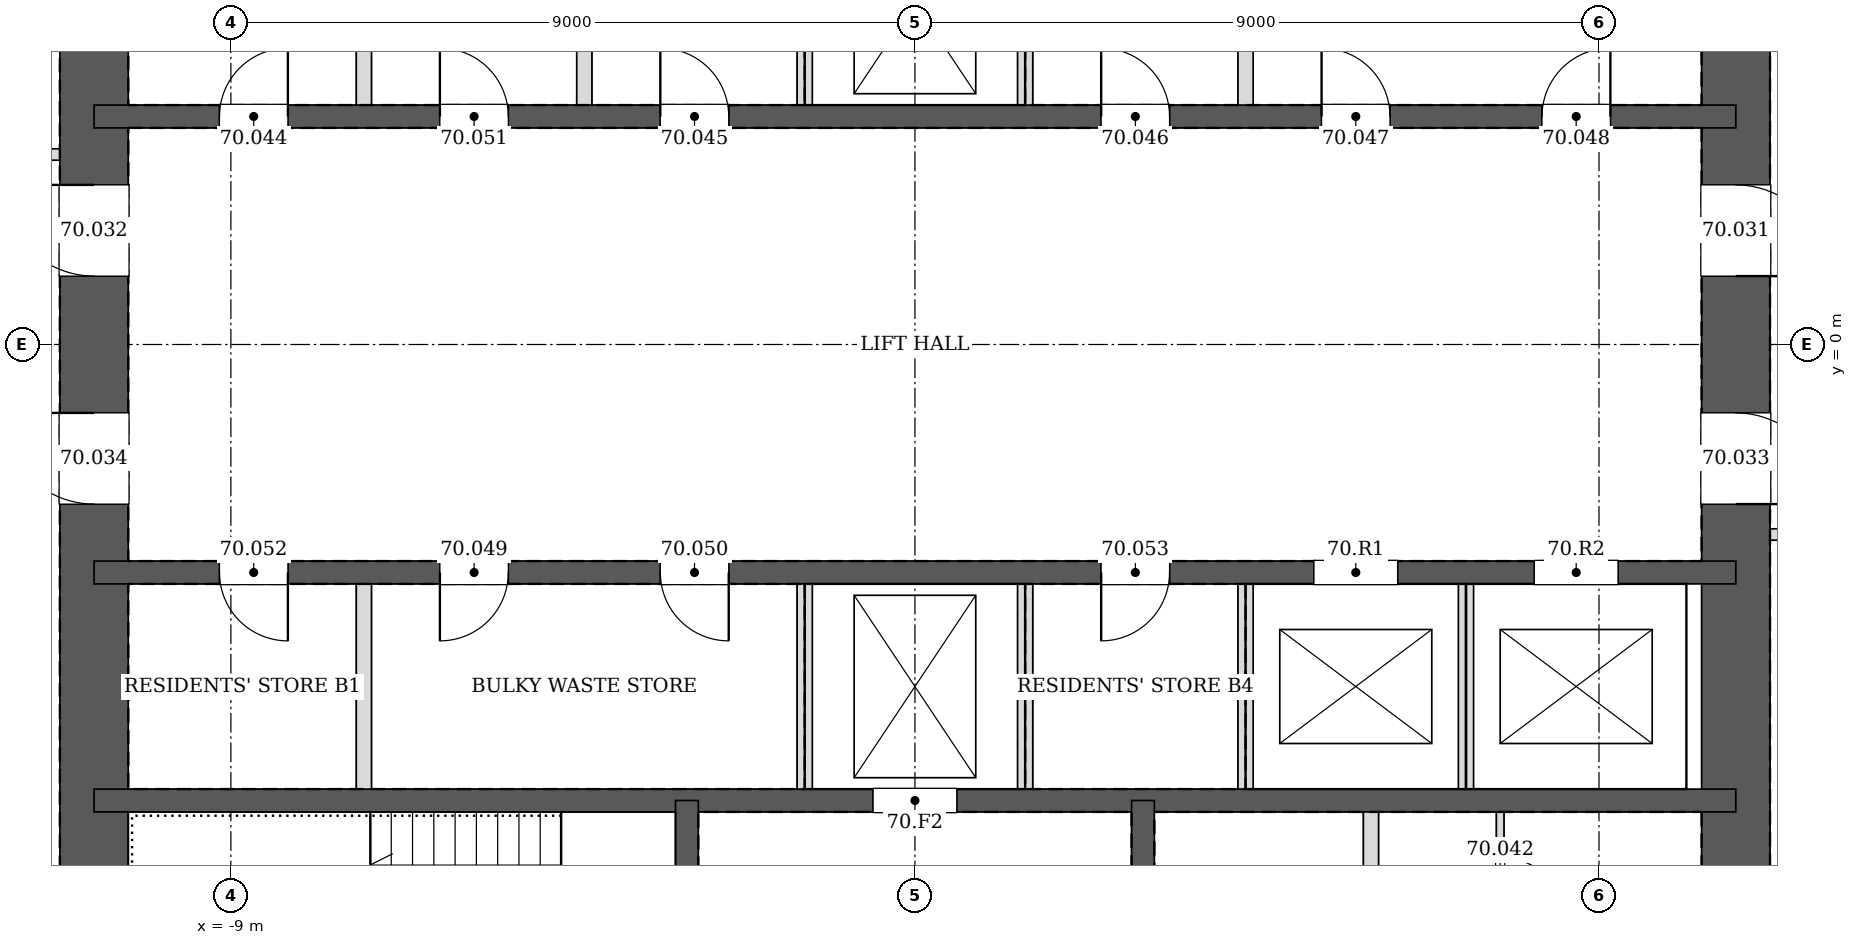
"""IFC4 building model, lengths in metres.
Left out: names, types, materials, properties, quantities, classifications, styles, units other than length and angle.
Written with IfcOpenShell. Run it as: python <this file> out.ifc"""

import sys

from ifc_helpers import new_model, si_unit, direction, frame, frame_2d, origin, place, context, subcontext, project, spatial, rectangle, extrude, element, fill, save


model = new_model("IFC4")
c1 = context("Model", 3, precision=1e-05, world=origin(), true_north=direction((0.0, 1.0)))
c2 = subcontext(c1, "Body", "Model", "MODEL_VIEW")
j1 = project(units=[si_unit("LENGTHUNIT", "METRE"), si_unit("PLANEANGLEUNIT", "RADIAN")], contexts=[c1])
p1 = place(None, origin())
s1 = spatial("IfcSite", under=j1, at=p1, CompositionType="ELEMENT")
p2 = place(p1, origin())
s2 = spatial("IfcBuilding", under=s1, at=p2, CompositionType="ELEMENT")
p3 = place(p2, frame((0.0, 0.0, 287.8)))
s3 = spatial("IfcBuildingStorey", under=s2, at=p3, CompositionType="ELEMENT", Elevation=287.8)
p4 = place(p3, frame((10.8, -10.8, 0.0), z_axis=(0.0, 0.0, 1.0), x_axis=(0.0, 1.0, 0.0)))
e1 = element("IfcWall", 1, at=p4, inside=s3, PredefinedType="SOLIDWALL", context=c2, shape_type="SweptSolid", body=[
    extrude(rectangle(XDim=21.6, YDim=0.9, at=frame_2d((10.8, 0.0))), origin(), (0.0, 0.0, 1.0), 3.4),
])
p5 = place(p4, frame((11.7, 0.0, 0.0)))
e2 = element("IfcOpeningElement", 2, at=p5, cuts=e1, PredefinedType="OPENING", context=c2, shape_type="SweptSolid", body=[
    extrude(rectangle(XDim=1.2, YDim=2.1, at=frame_2d((0.6, 1.05))), frame((0.0, 0.46, 0.0), z_axis=(0.0, -1.0, 0.0), x_axis=(1.0, 0.0, 0.0)), (0.0, 0.0, 1.0), 0.92),
])
p6 = place(p4, frame((8.7, 0.0, 0.0)))
e3 = element("IfcOpeningElement", 3, at=p6, cuts=e1, PredefinedType="OPENING", context=c2, shape_type="SweptSolid", body=[
    extrude(rectangle(XDim=1.2, YDim=2.1, at=frame_2d((0.6, 1.05))), frame((0.0, 0.46, 0.0), z_axis=(0.0, -1.0, 0.0), x_axis=(1.0, 0.0, 0.0)), (0.0, 0.0, 1.0), 0.92),
])
p7 = place(p3, frame((-10.8, 10.8, 0.0), z_axis=(0.0, 0.0, 1.0), x_axis=(0.0, -1.0, 0.0)))
e4 = element("IfcWall", 4, at=p7, inside=s3, PredefinedType="SOLIDWALL", context=c2, shape_type="SweptSolid", body=[
    extrude(rectangle(XDim=21.6, YDim=0.9, at=frame_2d((10.8, 0.0))), origin(), (0.0, 0.0, 1.0), 3.4),
])
p8 = place(p7, frame((8.7, 0.0, 0.0)))
e5 = element("IfcOpeningElement", 5, at=p8, cuts=e4, PredefinedType="OPENING", context=c2, shape_type="SweptSolid", body=[
    extrude(rectangle(XDim=1.2, YDim=2.1, at=frame_2d((0.6, 1.05))), frame((0.0, 0.46, 0.0), z_axis=(0.0, -1.0, 0.0), x_axis=(1.0, 0.0, 0.0)), (0.0, 0.0, 1.0), 0.92),
])
p9 = place(p7, frame((11.7, 0.0, 0.0)))
e6 = element("IfcOpeningElement", 6, at=p9, cuts=e4, PredefinedType="OPENING", context=c2, shape_type="SweptSolid", body=[
    extrude(rectangle(XDim=1.2, YDim=2.1, at=frame_2d((0.6, 1.05))), frame((0.0, 0.46, 0.0), z_axis=(0.0, -1.0, 0.0), x_axis=(1.0, 0.0, 0.0)), (0.0, 0.0, 1.0), 0.92),
])
p10 = place(p3, frame((-10.8, 3.0, 0.0), z_axis=(0.0, 0.0, 1.0), x_axis=(1.0, 0.0, 0.0)))
e7 = element("IfcWall", 7, at=p10, inside=s3, PredefinedType="SOLIDWALL", context=c2, shape_type="SweptSolid", body=[
    extrude(rectangle(XDim=21.6, YDim=0.3, at=frame_2d((10.8, 0.0))), origin(), (0.0, 0.0, 1.0), 3.4),
])
p11 = place(p10, frame((1.65, 0.0, 0.0)))
e8 = element("IfcOpeningElement", 8, at=p11, cuts=e7, PredefinedType="OPENING", context=c2, shape_type="SweptSolid", body=[
    extrude(rectangle(XDim=0.9, YDim=2.1, at=frame_2d((0.45, 1.05))), frame((0.0, 0.16, 0.0), z_axis=(0.0, -1.0, 0.0), x_axis=(1.0, 0.0, 0.0)), (0.0, 0.0, 1.0), 0.32),
])
p12 = place(p10, frame((7.45, 0.0, 0.0)))
e9 = element("IfcOpeningElement", 9, at=p12, cuts=e7, PredefinedType="OPENING", context=c2, shape_type="SweptSolid", body=[
    extrude(rectangle(XDim=0.9, YDim=2.1, at=frame_2d((0.45, 1.05))), frame((0.0, 0.16, 0.0), z_axis=(0.0, -1.0, 0.0), x_axis=(1.0, 0.0, 0.0)), (0.0, 0.0, 1.0), 0.32),
])
p13 = place(p10, frame((13.25, 0.0, 0.0)))
e10 = element("IfcOpeningElement", 10, at=p13, cuts=e7, PredefinedType="OPENING", context=c2, shape_type="SweptSolid", body=[
    extrude(rectangle(XDim=0.9, YDim=2.1, at=frame_2d((0.45, 1.05))), frame((0.0, 0.16, 0.0), z_axis=(0.0, -1.0, 0.0), x_axis=(1.0, 0.0, 0.0)), (0.0, 0.0, 1.0), 0.32),
])
p14 = place(p10, frame((16.15, 0.0, 0.0)))
e11 = element("IfcOpeningElement", 11, at=p14, cuts=e7, PredefinedType="OPENING", context=c2, shape_type="SweptSolid", body=[
    extrude(rectangle(XDim=0.9, YDim=2.1, at=frame_2d((0.45, 1.05))), frame((0.0, 0.16, 0.0), z_axis=(0.0, -1.0, 0.0), x_axis=(1.0, 0.0, 0.0)), (0.0, 0.0, 1.0), 0.32),
])
p15 = place(p10, frame((19.05, 0.0, 0.0)))
e12 = element("IfcOpeningElement", 12, at=p15, cuts=e7, PredefinedType="OPENING", context=c2, shape_type="SweptSolid", body=[
    extrude(rectangle(XDim=0.9, YDim=2.1, at=frame_2d((0.45, 1.05))), frame((0.0, 0.16, 0.0), z_axis=(0.0, -1.0, 0.0), x_axis=(1.0, 0.0, 0.0)), (0.0, 0.0, 1.0), 0.32),
])
p16 = place(p10, frame((4.55, 0.0, 0.0)))
e13 = element("IfcOpeningElement", 13, at=p16, cuts=e7, PredefinedType="OPENING", context=c2, shape_type="SweptSolid", body=[
    extrude(rectangle(XDim=0.9, YDim=2.1, at=frame_2d((0.45, 1.05))), frame((0.0, 0.16, 0.0), z_axis=(0.0, -1.0, 0.0), x_axis=(1.0, 0.0, 0.0)), (0.0, 0.0, 1.0), 0.32),
])
p17 = place(p3, frame((-10.8, -3.0, 0.0), z_axis=(0.0, 0.0, 1.0), x_axis=(1.0, 0.0, 0.0)))
e14 = element("IfcWall", 14, at=p17, inside=s3, PredefinedType="SOLIDWALL", context=c2, shape_type="SweptSolid", body=[
    extrude(rectangle(XDim=21.6, YDim=0.3, at=frame_2d((10.8, 0.0))), origin(), (0.0, 0.0, 1.0), 3.4),
])
p18 = place(p17, frame((4.55, 0.0, 0.0)))
e15 = element("IfcOpeningElement", 15, at=p18, cuts=e14, PredefinedType="OPENING", context=c2, shape_type="SweptSolid", body=[
    extrude(rectangle(XDim=0.9, YDim=2.1, at=frame_2d((0.45, 1.05))), frame((0.0, 0.16, 0.0), z_axis=(0.0, -1.0, 0.0), x_axis=(1.0, 0.0, 0.0)), (0.0, 0.0, 1.0), 0.32),
])
p19 = place(p17, frame((7.45, 0.0, 0.0)))
e16 = element("IfcOpeningElement", 16, at=p19, cuts=e14, PredefinedType="OPENING", context=c2, shape_type="SweptSolid", body=[
    extrude(rectangle(XDim=0.9, YDim=2.1, at=frame_2d((0.45, 1.05))), frame((0.0, 0.16, 0.0), z_axis=(0.0, -1.0, 0.0), x_axis=(1.0, 0.0, 0.0)), (0.0, 0.0, 1.0), 0.32),
])
p20 = place(p17, frame((1.65, 0.0, 0.0)))
e17 = element("IfcOpeningElement", 17, at=p20, cuts=e14, PredefinedType="OPENING", context=c2, shape_type="SweptSolid", body=[
    extrude(rectangle(XDim=0.9, YDim=2.1, at=frame_2d((0.45, 1.05))), frame((0.0, 0.16, 0.0), z_axis=(0.0, -1.0, 0.0), x_axis=(1.0, 0.0, 0.0)), (0.0, 0.0, 1.0), 0.32),
])
p21 = place(p17, frame((13.25, 0.0, 0.0)))
e18 = element("IfcOpeningElement", 18, at=p21, cuts=e14, PredefinedType="OPENING", context=c2, shape_type="SweptSolid", body=[
    extrude(rectangle(XDim=0.9, YDim=2.1, at=frame_2d((0.45, 1.05))), frame((0.0, 0.16, 0.0), z_axis=(0.0, -1.0, 0.0), x_axis=(1.0, 0.0, 0.0)), (0.0, 0.0, 1.0), 0.32),
])
p22 = place(p17, frame((16.05, 0.0, 0.0)))
e19 = element("IfcOpeningElement", 19, at=p22, cuts=e14, PredefinedType="OPENING", context=c2, shape_type="SweptSolid", body=[
    extrude(rectangle(XDim=1.1, YDim=2.1, at=frame_2d((0.55, 1.05))), frame((0.0, 0.16, 0.0), z_axis=(0.0, -1.0, 0.0), x_axis=(1.0, 0.0, 0.0)), (0.0, 0.0, 1.0), 0.32),
])
p23 = place(p17, frame((18.95, 0.0, 0.0)))
e20 = element("IfcOpeningElement", 20, at=p23, cuts=e14, PredefinedType="OPENING", context=c2, shape_type="SweptSolid", body=[
    extrude(rectangle(XDim=1.1, YDim=2.1, at=frame_2d((0.55, 1.05))), frame((0.0, 0.16, 0.0), z_axis=(0.0, -1.0, 0.0), x_axis=(1.0, 0.0, 0.0)), (0.0, 0.0, 1.0), 0.32),
])
p24 = place(p3, frame((-10.8, -6.0, 0.0), z_axis=(0.0, 0.0, 1.0), x_axis=(1.0, 0.0, 0.0)))
e21 = element("IfcWall", 21, at=p24, inside=s3, PredefinedType="SOLIDWALL", context=c2, shape_type="SweptSolid", body=[
    extrude(rectangle(XDim=21.6, YDim=0.3, at=frame_2d((10.8, 0.0))), origin(), (0.0, 0.0, 1.0), 3.4),
])
p25 = place(p24, frame((10.25, 0.0, 0.0)))
e22 = element("IfcOpeningElement", 22, at=p25, cuts=e21, PredefinedType="OPENING", context=c2, shape_type="SweptSolid", body=[
    extrude(rectangle(XDim=1.1, YDim=2.1, at=frame_2d((0.55, 1.05))), frame((0.0, 0.16, 0.0), z_axis=(0.0, -1.0, 0.0), x_axis=(1.0, 0.0, 0.0)), (0.0, 0.0, 1.0), 0.32),
])
p26 = place(p3, frame((-3.0, -6.0, 0.0), z_axis=(0.0, 0.0, 1.0), x_axis=(0.0, -1.0, 0.0)))
e23 = element("IfcWall", 23, at=p26, inside=s3, PredefinedType="SOLIDWALL", context=c2, shape_type="SweptSolid", body=[
    extrude(rectangle(XDim=4.8, YDim=0.3, at=frame_2d((2.4, 0.0))), origin(), (0.0, 0.0, 1.0), 3.4),
])
p27 = place(p26, frame((1.75, 0.0, 0.0)))
e24 = element("IfcOpeningElement", 24, at=p27, cuts=e23, PredefinedType="OPENING", context=c2, shape_type="SweptSolid", body=[
    extrude(rectangle(XDim=1.0, YDim=2.1, at=frame_2d((0.5, 1.05))), frame((0.0, 0.16, 0.0), z_axis=(0.0, -1.0, 0.0), x_axis=(1.0, 0.0, 0.0)), (0.0, 0.0, 1.0), 0.32),
])
p28 = place(p3, frame((3.0, -6.0, 0.0), z_axis=(0.0, 0.0, 1.0), x_axis=(0.0, -1.0, 0.0)))
e25 = element("IfcWall", 25, at=p28, inside=s3, PredefinedType="SOLIDWALL", context=c2, shape_type="SweptSolid", body=[
    extrude(rectangle(XDim=4.8, YDim=0.3, at=frame_2d((2.4, 0.0))), origin(), (0.0, 0.0, 1.0), 3.4),
])
for number, where, z_axis, x_axis in (
    (26, (11.25, -2.5, 0.0), (0.0, 0.0, 1.0), (1.0, 0.0, 0.0)),
    (27, (-11.25, 2.5, 0.0), (0.0, 0.0, 1.0), (-1.0, 0.0, 0.0)),
):
    element("IfcWall", number, at=place(p3, frame(where, z_axis=z_axis, x_axis=x_axis)), inside=s3, PredefinedType="PARTITIONING", context=c2, shape_type="SweptSolid", body=[
        extrude(rectangle(XDim=1.8, YDim=0.15, at=frame_2d((0.9, 0.0))), origin(), (0.0, 0.0, 1.0), 3.2),
    ])
for number, where, z_axis, x_axis in (
    (28, (-7.25, 3.15, 0.0), (0.0, 0.0, 1.0), (0.0, 1.0, 0.0)),
    (29, (-4.35, 3.15, 0.0), (0.0, 0.0, 1.0), (0.0, 1.0, 0.0)),
    (30, (-1.45, 3.15, 0.0), (0.0, 0.0, 1.0), (0.0, 1.0, 0.0)),
    (31, (1.45, 3.15, 0.0), (0.0, 0.0, 1.0), (0.0, 1.0, 0.0)),
    (32, (4.35, 3.15, 0.0), (0.0, 0.0, 1.0), (0.0, 1.0, 0.0)),
    (33, (-7.25, -5.85, 0.0), (0.0, 0.0, 1.0), (0.0, 1.0, 0.0)),
    (34, (-1.45, -5.85, 0.0), (0.0, 0.0, 1.0), (0.0, 1.0, 0.0)),
    (35, (1.45, -5.85, 0.0), (0.0, 0.0, 1.0), (0.0, 1.0, 0.0)),
    (36, (4.35, -5.85, 0.0), (0.0, 0.0, 1.0), (0.0, 1.0, 0.0)),
):
    element("IfcWall", number, at=place(p3, frame(where, z_axis=z_axis, x_axis=x_axis)), inside=s3, PredefinedType="PARTITIONING", context=c2, shape_type="SweptSolid", body=[
        extrude(rectangle(XDim=2.7, YDim=0.2, at=frame_2d((1.35, 0.0))), origin(), (0.0, 0.0, 1.0), 3.2),
    ])
p29 = place(p3, frame((7.25, -5.85, 0.0), z_axis=(0.0, 0.0, 1.0), x_axis=(0.0, 1.0, 0.0)))
e37 = element("IfcWall", 37, at=p29, inside=s3, PredefinedType="PARTITIONING", context=c2, shape_type="SweptSolid", body=[
    extrude(rectangle(XDim=2.7, YDim=0.2, at=frame_2d((1.35, 0.0))), origin(), (0.0, 0.0, 1.0), 3.4),
])
p30 = place(p3, frame((6.0, -10.35, 0.0), z_axis=(0.0, 0.0, 1.0), x_axis=(0.0, 1.0, 0.0)))
e38 = element("IfcWall", 38, at=p30, inside=s3, PredefinedType="PARTITIONING", context=c2, shape_type="SweptSolid", body=[
    extrude(rectangle(XDim=4.2, YDim=0.2, at=frame_2d((2.1, 0.0))), origin(), (0.0, 0.0, 1.0), 3.2),
])
p31 = place(p30, frame((0.3, 0.0, 0.0)))
e39 = element("IfcOpeningElement", 39, at=p31, cuts=e38, PredefinedType="OPENING", context=c2, shape_type="SweptSolid", body=[
    extrude(rectangle(XDim=0.9, YDim=2.1, at=frame_2d((0.45, 1.05))), frame((0.0, 0.11, 0.0), z_axis=(0.0, -1.0, 0.0), x_axis=(1.0, 0.0, 0.0)), (0.0, 0.0, 1.0), 0.22),
])
p32 = place(p3, frame((7.7, -10.35, 0.0), z_axis=(0.0, 0.0, 1.0), x_axis=(0.0, 1.0, 0.0)))
e40 = element("IfcWall", 40, at=p32, inside=s3, PredefinedType="PARTITIONING", context=c2, shape_type="SweptSolid", body=[
    extrude(rectangle(XDim=4.2, YDim=0.1, at=frame_2d((2.1, 0.0))), origin(), (0.0, 0.0, 1.0), 3.2),
])
p33 = place(p32, frame((2.7, 0.0, 0.0)))
e41 = element("IfcOpeningElement", 41, at=p33, cuts=e40, PredefinedType="OPENING", context=c2, shape_type="SweptSolid", body=[
    extrude(rectangle(XDim=0.9, YDim=2.1, at=frame_2d((0.45, 1.05))), frame((0.0, 0.06, 0.0), z_axis=(0.0, -1.0, 0.0), x_axis=(1.0, 0.0, 0.0)), (0.0, 0.0, 1.0), 0.12),
])
p34 = place(p32, frame((0.6, 0.0, 0.0)))
e42 = element("IfcOpeningElement", 42, at=p34, cuts=e40, PredefinedType="OPENING", context=c2, shape_type="SweptSolid", body=[
    extrude(rectangle(XDim=0.9, YDim=2.1, at=frame_2d((0.45, 1.05))), frame((0.0, 0.06, 0.0), z_axis=(0.0, -1.0, 0.0), x_axis=(1.0, 0.0, 0.0)), (0.0, 0.0, 1.0), 0.12),
])
p35 = place(p5, frame((1.2, 0.0, 0.0), z_axis=(0.0, 0.0, 1.0), x_axis=(-1.0, 0.0, 0.0)))
e43 = element("IfcDoor", 43, at=p35, inside=s3, OperationType="SINGLE_SWING_RIGHT", PredefinedType="DOOR", context=c2, shape_type="SweptSolid", body=[
    extrude(rectangle(XDim=1.2, YDim=2.1, at=frame_2d((0.6, 1.05))), frame((0.0, 0.025, 0.0), z_axis=(0.0, -1.0, 0.0), x_axis=(1.0, 0.0, 0.0)), (0.0, 0.0, 1.0), 0.05),
])
fill(e2, e43)
p36 = place(p8, frame((1.2, 0.0, 0.0), z_axis=(0.0, 0.0, 1.0), x_axis=(-1.0, 0.0, 0.0)))
e44 = element("IfcDoor", 44, at=p36, inside=s3, OperationType="SINGLE_SWING_RIGHT", PredefinedType="DOOR", context=c2, shape_type="SweptSolid", body=[
    extrude(rectangle(XDim=1.2, YDim=2.1, at=frame_2d((0.6, 1.05))), frame((0.0, 0.025, 0.0), z_axis=(0.0, -1.0, 0.0), x_axis=(1.0, 0.0, 0.0)), (0.0, 0.0, 1.0), 0.05),
])
fill(e5, e44)
p37 = place(p6, frame((1.2, 0.0, 0.0), z_axis=(0.0, 0.0, 1.0), x_axis=(-1.0, 0.0, 0.0)))
e45 = element("IfcDoor", 45, at=p37, inside=s3, OperationType="SINGLE_SWING_RIGHT", PredefinedType="DOOR", context=c2, shape_type="SweptSolid", body=[
    extrude(rectangle(XDim=1.2, YDim=2.1, at=frame_2d((0.6, 1.05))), frame((0.0, 0.025, 0.0), z_axis=(0.0, -1.0, 0.0), x_axis=(1.0, 0.0, 0.0)), (0.0, 0.0, 1.0), 0.05),
])
fill(e3, e45)
p38 = place(p9, frame((1.2, 0.0, 0.0), z_axis=(0.0, 0.0, 1.0), x_axis=(-1.0, 0.0, 0.0)))
e46 = element("IfcDoor", 46, at=p38, inside=s3, OperationType="SINGLE_SWING_RIGHT", PredefinedType="DOOR", context=c2, shape_type="SweptSolid", body=[
    extrude(rectangle(XDim=1.2, YDim=2.1, at=frame_2d((0.6, 1.05))), frame((0.0, 0.025, 0.0), z_axis=(0.0, -1.0, 0.0), x_axis=(1.0, 0.0, 0.0)), (0.0, 0.0, 1.0), 0.05),
])
fill(e6, e46)
p39 = place(p33, frame((0.9, 0.0, 0.0), z_axis=(0.0, 0.0, 1.0), x_axis=(-1.0, 0.0, 0.0)))
e47 = element("IfcDoor", 47, at=p39, inside=s3, OperationType="SINGLE_SWING_RIGHT", PredefinedType="DOOR", context=c2, shape_type="SweptSolid", body=[
    extrude(rectangle(XDim=0.9, YDim=2.1, at=frame_2d((0.45, 1.05))), frame((0.0, 0.025, 0.0), z_axis=(0.0, -1.0, 0.0), x_axis=(1.0, 0.0, 0.0)), (0.0, 0.0, 1.0), 0.05),
])
fill(e41, e47)
p40 = place(p11, origin())
e48 = element("IfcDoor", 48, at=p40, inside=s3, OperationType="SINGLE_SWING_RIGHT", PredefinedType="DOOR", context=c2, shape_type="SweptSolid", body=[
    extrude(rectangle(XDim=0.9, YDim=2.1, at=frame_2d((0.45, 1.05))), frame((0.0, 0.025, 0.0), z_axis=(0.0, -1.0, 0.0), x_axis=(1.0, 0.0, 0.0)), (0.0, 0.0, 1.0), 0.05),
])
fill(e8, e48)
p41 = place(p12, origin())
e49 = element("IfcDoor", 49, at=p41, inside=s3, OperationType="SINGLE_SWING_LEFT", PredefinedType="DOOR", context=c2, shape_type="SweptSolid", body=[
    extrude(rectangle(XDim=0.9, YDim=2.1, at=frame_2d((0.45, 1.05))), frame((0.0, 0.025, 0.0), z_axis=(0.0, -1.0, 0.0), x_axis=(1.0, 0.0, 0.0)), (0.0, 0.0, 1.0), 0.05),
])
fill(e9, e49)
p42 = place(p13, origin())
e50 = element("IfcDoor", 50, at=p42, inside=s3, OperationType="SINGLE_SWING_LEFT", PredefinedType="DOOR", context=c2, shape_type="SweptSolid", body=[
    extrude(rectangle(XDim=0.9, YDim=2.1, at=frame_2d((0.45, 1.05))), frame((0.0, 0.025, 0.0), z_axis=(0.0, -1.0, 0.0), x_axis=(1.0, 0.0, 0.0)), (0.0, 0.0, 1.0), 0.05),
])
fill(e10, e50)
p43 = place(p14, origin())
e51 = element("IfcDoor", 51, at=p43, inside=s3, OperationType="SINGLE_SWING_LEFT", PredefinedType="DOOR", context=c2, shape_type="SweptSolid", body=[
    extrude(rectangle(XDim=0.9, YDim=2.1, at=frame_2d((0.45, 1.05))), frame((0.0, 0.025, 0.0), z_axis=(0.0, -1.0, 0.0), x_axis=(1.0, 0.0, 0.0)), (0.0, 0.0, 1.0), 0.05),
])
fill(e11, e51)
p44 = place(p15, origin())
e52 = element("IfcDoor", 52, at=p44, inside=s3, OperationType="SINGLE_SWING_RIGHT", PredefinedType="DOOR", context=c2, shape_type="SweptSolid", body=[
    extrude(rectangle(XDim=0.9, YDim=2.1, at=frame_2d((0.45, 1.05))), frame((0.0, 0.025, 0.0), z_axis=(0.0, -1.0, 0.0), x_axis=(1.0, 0.0, 0.0)), (0.0, 0.0, 1.0), 0.05),
])
fill(e12, e52)
p45 = place(p18, frame((0.9, 0.0, 0.0), z_axis=(0.0, 0.0, 1.0), x_axis=(-1.0, 0.0, 0.0)))
e53 = element("IfcDoor", 53, at=p45, inside=s3, OperationType="SINGLE_SWING_RIGHT", PredefinedType="DOOR", context=c2, shape_type="SweptSolid", body=[
    extrude(rectangle(XDim=0.9, YDim=2.1, at=frame_2d((0.45, 1.05))), frame((0.0, 0.025, 0.0), z_axis=(0.0, -1.0, 0.0), x_axis=(1.0, 0.0, 0.0)), (0.0, 0.0, 1.0), 0.05),
])
fill(e15, e53)
p46 = place(p19, frame((0.9, 0.0, 0.0), z_axis=(0.0, 0.0, 1.0), x_axis=(-1.0, 0.0, 0.0)))
e54 = element("IfcDoor", 54, at=p46, inside=s3, OperationType="SINGLE_SWING_LEFT", PredefinedType="DOOR", context=c2, shape_type="SweptSolid", body=[
    extrude(rectangle(XDim=0.9, YDim=2.1, at=frame_2d((0.45, 1.05))), frame((0.0, 0.025, 0.0), z_axis=(0.0, -1.0, 0.0), x_axis=(1.0, 0.0, 0.0)), (0.0, 0.0, 1.0), 0.05),
])
fill(e16, e54)
p47 = place(p16, origin())
e55 = element("IfcDoor", 55, at=p47, inside=s3, OperationType="SINGLE_SWING_LEFT", PredefinedType="DOOR", context=c2, shape_type="SweptSolid", body=[
    extrude(rectangle(XDim=0.9, YDim=2.1, at=frame_2d((0.45, 1.05))), frame((0.0, 0.025, 0.0), z_axis=(0.0, -1.0, 0.0), x_axis=(1.0, 0.0, 0.0)), (0.0, 0.0, 1.0), 0.05),
])
fill(e13, e55)
p48 = place(p20, frame((0.9, 0.0, 0.0), z_axis=(0.0, 0.0, 1.0), x_axis=(-1.0, 0.0, 0.0)))
e56 = element("IfcDoor", 56, at=p48, inside=s3, OperationType="SINGLE_SWING_LEFT", PredefinedType="DOOR", context=c2, shape_type="SweptSolid", body=[
    extrude(rectangle(XDim=0.9, YDim=2.1, at=frame_2d((0.45, 1.05))), frame((0.0, 0.025, 0.0), z_axis=(0.0, -1.0, 0.0), x_axis=(1.0, 0.0, 0.0)), (0.0, 0.0, 1.0), 0.05),
])
fill(e17, e56)
p49 = place(p21, frame((0.9, 0.0, 0.0), z_axis=(0.0, 0.0, 1.0), x_axis=(-1.0, 0.0, 0.0)))
e57 = element("IfcDoor", 57, at=p49, inside=s3, OperationType="SINGLE_SWING_RIGHT", PredefinedType="DOOR", context=c2, shape_type="SweptSolid", body=[
    extrude(rectangle(XDim=0.9, YDim=2.1, at=frame_2d((0.45, 1.05))), frame((0.0, 0.025, 0.0), z_axis=(0.0, -1.0, 0.0), x_axis=(1.0, 0.0, 0.0)), (0.0, 0.0, 1.0), 0.05),
])
fill(e18, e57)
p50 = place(p25, origin())
e58 = element("IfcDoor", 58, at=p50, inside=s3, OperationType="DOUBLE_DOOR_SLIDING", PredefinedType="DOOR", context=c2, shape_type="SweptSolid", body=[
    extrude(rectangle(XDim=1.1, YDim=2.1, at=frame_2d((0.55, 1.05))), frame((0.0, 0.025, 0.0), z_axis=(0.0, -1.0, 0.0), x_axis=(1.0, 0.0, 0.0)), (0.0, 0.0, 1.0), 0.05),
])
fill(e22, e58)
p51 = place(p22, origin())
e59 = element("IfcDoor", 59, at=p51, inside=s3, OperationType="DOUBLE_DOOR_SLIDING", PredefinedType="DOOR", context=c2, shape_type="SweptSolid", body=[
    extrude(rectangle(XDim=1.1, YDim=2.1, at=frame_2d((0.55, 1.05))), frame((0.0, 0.025, 0.0), z_axis=(0.0, -1.0, 0.0), x_axis=(1.0, 0.0, 0.0)), (0.0, 0.0, 1.0), 0.05),
])
fill(e19, e59)
p52 = place(p23, origin())
e60 = element("IfcDoor", 60, at=p52, inside=s3, OperationType="DOUBLE_DOOR_SLIDING", PredefinedType="DOOR", context=c2, shape_type="SweptSolid", body=[
    extrude(rectangle(XDim=1.1, YDim=2.1, at=frame_2d((0.55, 1.05))), frame((0.0, 0.025, 0.0), z_axis=(0.0, -1.0, 0.0), x_axis=(1.0, 0.0, 0.0)), (0.0, 0.0, 1.0), 0.05),
])
fill(e20, e60)
save(model, sys.argv[1])
